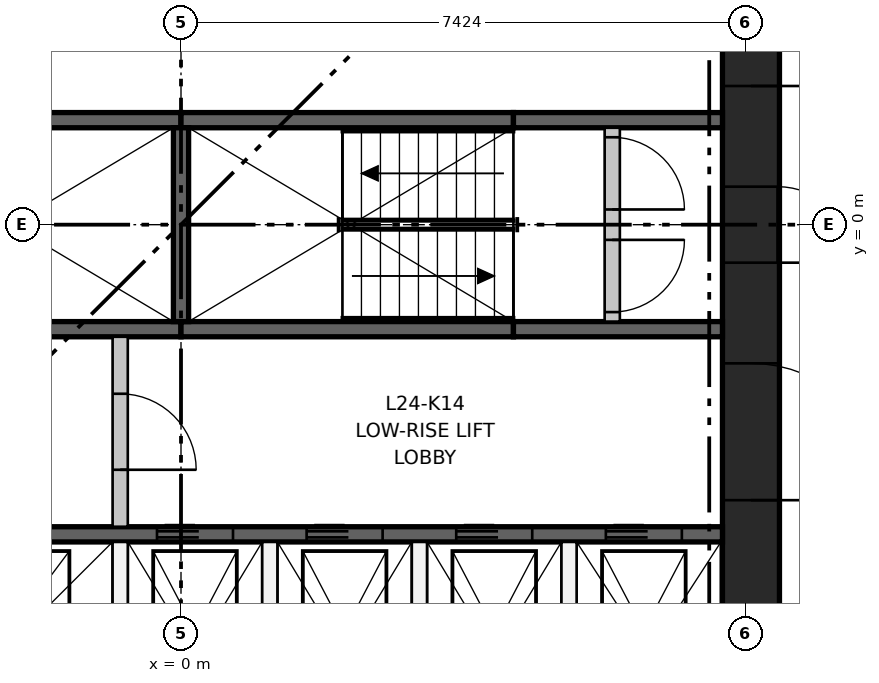
"""IFC4 building model, lengths in metres.
Left out: names, types, materials, properties, quantities, classifications, styles, units other than length and angle.
Written with IfcOpenShell. Run it as: python <this file> out.ifc"""

import sys

from ifc_helpers import new_model, si_unit, direction, frame, frame_2d, origin, place, context, subcontext, project, spatial, rectangle, extrude, element, fill, save


model = new_model("IFC4")
c1 = context("Model", 3, precision=1e-05, world=origin(), true_north=direction((0.0, 1.0)))
c2 = subcontext(c1, "Body", "Model", "MODEL_VIEW")
j1 = project(units=[si_unit("LENGTHUNIT", "METRE"), si_unit("PLANEANGLEUNIT", "RADIAN")], contexts=[c1])
p1 = place(None, origin())
s1 = spatial("IfcSite", under=j1, at=p1, CompositionType="ELEMENT")
p2 = place(p1, origin())
s2 = spatial("IfcBuilding", under=s1, at=p2, CompositionType="ELEMENT")
p3 = place(p2, frame((0.0, 0.0, 94.65)))
s3 = spatial("IfcBuildingStorey", under=s2, at=p3, CompositionType="ELEMENT", Elevation=94.65)
p4 = place(p3, frame((7.499, -7.124, 0.0), z_axis=(0.0, 0.0, 1.0), x_axis=(0.0, 1.0, 0.0)))
e1 = element("IfcWall", 1, at=p4, inside=s3, PredefinedType="SHEAR", context=c2, shape_type="SweptSolid", body=[
    extrude(rectangle(XDim=14.248, YDim=0.75, at=frame_2d((7.124, 0.0))), origin(), (0.0, 0.0, 1.0), 3.65),
])
p5 = place(p4, frame((6.624, 0.0, 0.0)))
e2 = element("IfcOpeningElement", 2, at=p5, cuts=e1, PredefinedType="OPENING", context=c2, shape_type="SweptSolid", body=[
    extrude(rectangle(XDim=1.0, YDim=2.1, at=frame_2d((0.5, 1.05))), frame((0.0, 0.385, 0.0), z_axis=(0.0, -1.0, 0.0), x_axis=(1.0, 0.0, 0.0)), (0.0, 0.0, 1.0), 0.77),
])
p6 = place(p4, frame((3.5, 0.0, 0.0)))
e3 = element("IfcOpeningElement", 3, at=p6, cuts=e1, PredefinedType="OPENING", context=c2, shape_type="SweptSolid", body=[
    extrude(rectangle(XDim=1.8, YDim=2.1, at=frame_2d((0.9, 1.05))), frame((0.0, 0.385, 0.0), z_axis=(0.0, -1.0, 0.0), x_axis=(1.0, 0.0, 0.0)), (0.0, 0.0, 1.0), 0.77),
])
p7 = place(p4, frame((8.948, 0.0, 0.0)))
e4 = element("IfcOpeningElement", 4, at=p7, cuts=e1, PredefinedType="OPENING", context=c2, shape_type="SweptSolid", body=[
    extrude(rectangle(XDim=1.8, YDim=2.1, at=frame_2d((0.9, 1.05))), frame((0.0, 0.385, 0.0), z_axis=(0.0, -1.0, 0.0), x_axis=(1.0, 0.0, 0.0)), (0.0, 0.0, 1.0), 0.77),
])
p8 = place(p3, frame((-7.124, -4.074, 0.0), z_axis=(0.0, 0.0, 1.0), x_axis=(1.0, 0.0, 0.0)))
e5 = element("IfcWall", 5, at=p8, inside=s3, PredefinedType="SHEAR", context=c2, shape_type="SweptSolid", body=[
    extrude(rectangle(XDim=14.248, YDim=0.2, at=frame_2d((7.124, 0.0))), origin(), (0.0, 0.0, 1.0), 3.3),
])
p9 = place(p8, frame((1.069, 0.0, 0.0)))
e6 = element("IfcOpeningElement", 6, at=p9, cuts=e5, PredefinedType="OPENING", context=c2, shape_type="SweptSolid", body=[
    extrude(rectangle(XDim=1.1, YDim=2.1, at=frame_2d((0.55, 1.05))), frame((0.0, 0.11, 0.0), z_axis=(0.0, -1.0, 0.0), x_axis=(1.0, 0.0, 0.0)), (0.0, 0.0, 1.0), 0.22),
])
p10 = place(p8, frame((4.206, 0.0, 0.0)))
e7 = element("IfcOpeningElement", 7, at=p10, cuts=e5, PredefinedType="OPENING", context=c2, shape_type="SweptSolid", body=[
    extrude(rectangle(XDim=1.1, YDim=2.1, at=frame_2d((0.55, 1.05))), frame((0.0, 0.11, 0.0), z_axis=(0.0, -1.0, 0.0), x_axis=(1.0, 0.0, 0.0)), (0.0, 0.0, 1.0), 0.22),
])
p11 = place(p8, frame((6.808, 0.0, 0.0)))
e8 = element("IfcOpeningElement", 8, at=p11, cuts=e5, PredefinedType="OPENING", context=c2, shape_type="SweptSolid", body=[
    extrude(rectangle(XDim=1.0, YDim=2.1, at=frame_2d((0.5, 1.05))), frame((0.0, 0.11, 0.0), z_axis=(0.0, -1.0, 0.0), x_axis=(1.0, 0.0, 0.0)), (0.0, 0.0, 1.0), 0.22),
])
p12 = place(p8, frame((8.777, 0.0, 0.0)))
e9 = element("IfcOpeningElement", 9, at=p12, cuts=e5, PredefinedType="OPENING", context=c2, shape_type="SweptSolid", body=[
    extrude(rectangle(XDim=1.0, YDim=2.1, at=frame_2d((0.5, 1.05))), frame((0.0, 0.11, 0.0), z_axis=(0.0, -1.0, 0.0), x_axis=(1.0, 0.0, 0.0)), (0.0, 0.0, 1.0), 0.22),
])
p13 = place(p8, frame((10.745, 0.0, 0.0)))
e10 = element("IfcOpeningElement", 10, at=p13, cuts=e5, PredefinedType="OPENING", context=c2, shape_type="SweptSolid", body=[
    extrude(rectangle(XDim=1.0, YDim=2.1, at=frame_2d((0.5, 1.05))), frame((0.0, 0.11, 0.0), z_axis=(0.0, -1.0, 0.0), x_axis=(1.0, 0.0, 0.0)), (0.0, 0.0, 1.0), 0.22),
])
p14 = place(p8, frame((12.714, 0.0, 0.0)))
e11 = element("IfcOpeningElement", 11, at=p14, cuts=e5, PredefinedType="OPENING", context=c2, shape_type="SweptSolid", body=[
    extrude(rectangle(XDim=1.0, YDim=2.1, at=frame_2d((0.5, 1.05))), frame((0.0, 0.11, 0.0), z_axis=(0.0, -1.0, 0.0), x_axis=(1.0, 0.0, 0.0)), (0.0, 0.0, 1.0), 0.22),
])
for number, where, z_axis, x_axis in (
    (12, (-4.374, -1.375, 0.0), (0.0, 0.0, 1.0), (1.0, 0.0, 0.0)),
    (13, (0.0, -1.375, 0.0), (0.0, 0.0, 1.0), (1.0, 0.0, 0.0)),
):
    element("IfcWall", number, at=place(p3, frame(where, z_axis=z_axis, x_axis=x_axis)), inside=s3, PredefinedType="SHEAR", context=c2, shape_type="SweptSolid", body=[
        extrude(rectangle(XDim=4.374, YDim=0.2, at=frame_2d((2.187, 0.0))), origin(), (0.0, 0.0, 1.0), 3.3),
    ])
p15 = place(p3, frame((4.374, -1.375, 0.0), z_axis=(0.0, 0.0, 1.0), x_axis=(1.0, 0.0, 0.0)))
e14 = element("IfcWall", 14, at=p15, inside=s3, PredefinedType="SHEAR", context=c2, shape_type="SweptSolid", body=[
    extrude(rectangle(XDim=2.75, YDim=0.2, at=frame_2d((1.375, 0.0))), origin(), (0.0, 0.0, 1.0), 3.3),
])
for number, where, z_axis, x_axis in (
    (15, (-4.374, 1.375, 0.0), (0.0, 0.0, 1.0), (1.0, 0.0, 0.0)),
    (16, (0.0, 1.375, 0.0), (0.0, 0.0, 1.0), (1.0, 0.0, 0.0)),
):
    element("IfcWall", number, at=place(p3, frame(where, z_axis=z_axis, x_axis=x_axis)), inside=s3, PredefinedType="SHEAR", context=c2, shape_type="SweptSolid", body=[
        extrude(rectangle(XDim=4.374, YDim=0.2, at=frame_2d((2.187, 0.0))), origin(), (0.0, 0.0, 1.0), 3.3),
    ])
p16 = place(p3, frame((4.374, 1.375, 0.0), z_axis=(0.0, 0.0, 1.0), x_axis=(1.0, 0.0, 0.0)))
e17 = element("IfcWall", 17, at=p16, inside=s3, PredefinedType="SHEAR", context=c2, shape_type="SweptSolid", body=[
    extrude(rectangle(XDim=2.75, YDim=0.2, at=frame_2d((1.375, 0.0))), origin(), (0.0, 0.0, 1.0), 3.3),
])
p17 = place(p3, frame((0.0, -1.275, 0.0), z_axis=(0.0, 0.0, 1.0), x_axis=(0.0, 1.0, 0.0)))
e18 = element("IfcWall", 18, at=p17, inside=s3, PredefinedType="SHEAR", context=c2, shape_type="SweptSolid", body=[
    extrude(rectangle(XDim=2.55, YDim=0.2, at=frame_2d((1.275, 0.0))), origin(), (0.0, 0.0, 1.0), 3.3),
])
p18 = place(p3, frame((-0.8, -7.124, 0.0), z_axis=(0.0, 0.0, 1.0), x_axis=(0.0, 1.0, 0.0)))
e19 = element("IfcWall", 19, at=p18, inside=s3, PredefinedType="PARTITIONING", context=c2, shape_type="SweptSolid", body=[
    extrude(rectangle(XDim=2.95, YDim=0.2, at=frame_2d((1.475, 0.0))), origin(), (0.0, 0.0, 1.0), 3.3),
])
p19 = place(p3, frame((-0.8, -3.974, 0.0), z_axis=(0.0, 0.0, 1.0), x_axis=(0.0, 1.0, 0.0)))
e20 = element("IfcWall", 20, at=p19, inside=s3, PredefinedType="PARTITIONING", context=c2, shape_type="SweptSolid", body=[
    extrude(rectangle(XDim=2.499, YDim=0.2, at=frame_2d((1.25, 0.0))), origin(), (0.0, 0.0, 1.0), 3.3),
])
p20 = place(p19, frame((0.75, 0.0, 0.0)))
e21 = element("IfcOpeningElement", 21, at=p20, cuts=e20, PredefinedType="OPENING", context=c2, shape_type="SweptSolid", body=[
    extrude(rectangle(XDim=1.0, YDim=2.1, at=frame_2d((0.5, 1.05))), frame((0.0, 0.11, 0.0), z_axis=(0.0, -1.0, 0.0), x_axis=(1.0, 0.0, 0.0)), (0.0, 0.0, 1.0), 0.22),
])
for number, where, z_axis, x_axis in (
    (22, (1.168, -7.124, 0.0), (0.0, 0.0, 1.0), (0.0, 1.0, 0.0)),
    (23, (3.137, -7.124, 0.0), (0.0, 0.0, 1.0), (0.0, 1.0, 0.0)),
    (24, (5.105, -7.124, 0.0), (0.0, 0.0, 1.0), (0.0, 1.0, 0.0)),
):
    element("IfcWall", number, at=place(p3, frame(where, z_axis=z_axis, x_axis=x_axis)), inside=s3, PredefinedType="PARTITIONING", context=c2, shape_type="SweptSolid", body=[
        extrude(rectangle(XDim=2.95, YDim=0.2, at=frame_2d((1.475, 0.0))), origin(), (0.0, 0.0, 1.0), 3.3),
    ])
p21 = place(p3, frame((5.674, -1.275, 0.0), z_axis=(0.0, 0.0, 1.0), x_axis=(0.0, 1.0, 0.0)))
e25 = element("IfcWall", 25, at=p21, inside=s3, PredefinedType="PARTITIONING", context=c2, shape_type="SweptSolid", body=[
    extrude(rectangle(XDim=2.55, YDim=0.2, at=frame_2d((1.275, 0.0))), origin(), (0.0, 0.0, 1.0), 3.3),
])
p22 = place(p21, frame((0.125, 0.0, 0.0)))
e26 = element("IfcOpeningElement", 26, at=p22, cuts=e25, PredefinedType="OPENING", context=c2, shape_type="SweptSolid", body=[
    extrude(rectangle(XDim=0.95, YDim=2.1, at=frame_2d((0.475, 1.05))), frame((0.0, 0.11, 0.0), z_axis=(0.0, -1.0, 0.0), x_axis=(1.0, 0.0, 0.0)), (0.0, 0.0, 1.0), 0.22),
])
p23 = place(p21, frame((1.475, 0.0, 0.0)))
e27 = element("IfcOpeningElement", 27, at=p23, cuts=e25, PredefinedType="OPENING", context=c2, shape_type="SweptSolid", body=[
    extrude(rectangle(XDim=0.95, YDim=2.1, at=frame_2d((0.475, 1.05))), frame((0.0, 0.11, 0.0), z_axis=(0.0, -1.0, 0.0), x_axis=(1.0, 0.0, 0.0)), (0.0, 0.0, 1.0), 0.22),
])
p24 = place(p11, origin())
e28 = element("IfcDoor", 28, at=p24, inside=s3, OperationType="DOUBLE_DOOR_SLIDING", PredefinedType="DOOR", context=c2, shape_type="SweptSolid", body=[
    extrude(rectangle(XDim=1.0, YDim=2.1, at=frame_2d((0.5, 1.05))), frame((0.0, 0.025, 0.0), z_axis=(0.0, -1.0, 0.0), x_axis=(1.0, 0.0, 0.0)), (0.0, 0.0, 1.0), 0.05),
])
fill(e8, e28)
p25 = place(p12, origin())
e29 = element("IfcDoor", 29, at=p25, inside=s3, OperationType="DOUBLE_DOOR_SLIDING", PredefinedType="DOOR", context=c2, shape_type="SweptSolid", body=[
    extrude(rectangle(XDim=1.0, YDim=2.1, at=frame_2d((0.5, 1.05))), frame((0.0, 0.025, 0.0), z_axis=(0.0, -1.0, 0.0), x_axis=(1.0, 0.0, 0.0)), (0.0, 0.0, 1.0), 0.05),
])
fill(e9, e29)
p26 = place(p13, origin())
e30 = element("IfcDoor", 30, at=p26, inside=s3, OperationType="DOUBLE_DOOR_SLIDING", PredefinedType="DOOR", context=c2, shape_type="SweptSolid", body=[
    extrude(rectangle(XDim=1.0, YDim=2.1, at=frame_2d((0.5, 1.05))), frame((0.0, 0.025, 0.0), z_axis=(0.0, -1.0, 0.0), x_axis=(1.0, 0.0, 0.0)), (0.0, 0.0, 1.0), 0.05),
])
fill(e10, e30)
p27 = place(p14, origin())
e31 = element("IfcDoor", 31, at=p27, inside=s3, OperationType="DOUBLE_DOOR_SLIDING", PredefinedType="DOOR", context=c2, shape_type="SweptSolid", body=[
    extrude(rectangle(XDim=1.0, YDim=2.1, at=frame_2d((0.5, 1.05))), frame((0.0, 0.025, 0.0), z_axis=(0.0, -1.0, 0.0), x_axis=(1.0, 0.0, 0.0)), (0.0, 0.0, 1.0), 0.05),
])
fill(e11, e31)
p28 = place(p22, frame((0.95, 0.0, 0.0), z_axis=(0.0, 0.0, 1.0), x_axis=(-1.0, 0.0, 0.0)))
e32 = element("IfcDoor", 32, at=p28, inside=s3, OperationType="SINGLE_SWING_RIGHT", PredefinedType="DOOR", context=c2, shape_type="SweptSolid", body=[
    extrude(rectangle(XDim=0.95, YDim=2.1, at=frame_2d((0.475, 1.05))), frame((0.0, 0.025, 0.0), z_axis=(0.0, -1.0, 0.0), x_axis=(1.0, 0.0, 0.0)), (0.0, 0.0, 1.0), 0.05),
])
fill(e26, e32)
p29 = place(p23, frame((0.95, 0.0, 0.0), z_axis=(0.0, 0.0, 1.0), x_axis=(-1.0, 0.0, 0.0)))
e33 = element("IfcDoor", 33, at=p29, inside=s3, OperationType="SINGLE_SWING_LEFT", PredefinedType="DOOR", context=c2, shape_type="SweptSolid", body=[
    extrude(rectangle(XDim=0.95, YDim=2.1, at=frame_2d((0.475, 1.05))), frame((0.0, 0.025, 0.0), z_axis=(0.0, -1.0, 0.0), x_axis=(1.0, 0.0, 0.0)), (0.0, 0.0, 1.0), 0.05),
])
fill(e27, e33)
p30 = place(p20, frame((1.0, 0.0, 0.0), z_axis=(0.0, 0.0, 1.0), x_axis=(-1.0, 0.0, 0.0)))
e34 = element("IfcDoor", 34, at=p30, inside=s3, OperationType="SINGLE_SWING_LEFT", PredefinedType="DOOR", context=c2, shape_type="SweptSolid", body=[
    extrude(rectangle(XDim=1.0, YDim=2.1, at=frame_2d((0.5, 1.05))), frame((0.0, 0.025, 0.0), z_axis=(0.0, -1.0, 0.0), x_axis=(1.0, 0.0, 0.0)), (0.0, 0.0, 1.0), 0.05),
])
fill(e21, e34)
p31 = place(p5, frame((1.0, 0.0, 0.0), z_axis=(0.0, 0.0, 1.0), x_axis=(-1.0, 0.0, 0.0)))
e35 = element("IfcDoor", 35, at=p31, inside=s3, OperationType="SINGLE_SWING_LEFT", PredefinedType="DOOR", context=c2, shape_type="SweptSolid", body=[
    extrude(rectangle(XDim=1.0, YDim=2.1, at=frame_2d((0.5, 1.05))), frame((0.0, 0.375, 0.0), z_axis=(0.0, -1.0, 0.0), x_axis=(1.0, 0.0, 0.0)), (0.0, 0.0, 1.0), 0.05),
])
fill(e2, e35)
p32 = place(p6, frame((1.8, 0.0, 0.0), z_axis=(0.0, 0.0, 1.0), x_axis=(-1.0, 0.0, 0.0)))
e36 = element("IfcDoor", 36, at=p32, inside=s3, OperationType="DOUBLE_DOOR_SINGLE_SWING", PredefinedType="DOOR", context=c2, shape_type="SweptSolid", body=[
    extrude(rectangle(XDim=1.8, YDim=2.1, at=frame_2d((0.9, 1.05))), frame((0.0, 0.025, 0.0), z_axis=(0.0, -1.0, 0.0), x_axis=(1.0, 0.0, 0.0)), (0.0, 0.0, 1.0), 0.05),
])
fill(e3, e36)
p33 = place(p7, frame((1.8, 0.0, 0.0), z_axis=(0.0, 0.0, 1.0), x_axis=(-1.0, 0.0, 0.0)))
e37 = element("IfcDoor", 37, at=p33, inside=s3, OperationType="DOUBLE_DOOR_SINGLE_SWING", PredefinedType="DOOR", context=c2, shape_type="SweptSolid", body=[
    extrude(rectangle(XDim=1.8, YDim=2.1, at=frame_2d((0.9, 1.05))), frame((0.0, 0.025, 0.0), z_axis=(0.0, -1.0, 0.0), x_axis=(1.0, 0.0, 0.0)), (0.0, 0.0, 1.0), 0.05),
])
fill(e4, e37)
save(model, sys.argv[1])
